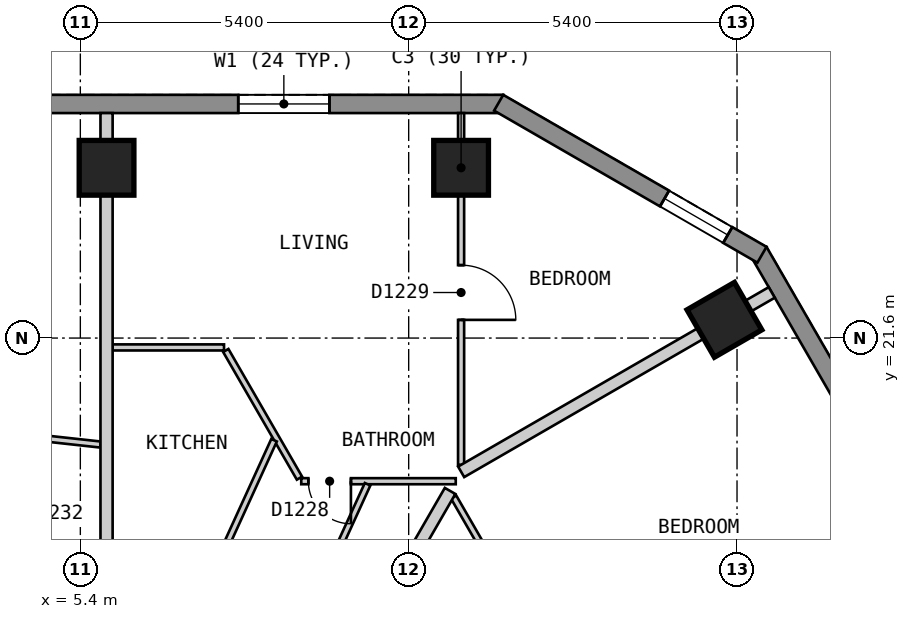
"""IFC4 building model, lengths in metres.
Left out: names, types, materials, properties, quantities, classifications, styles, units other than length and angle.
Written with IfcOpenShell. Run it as: python <this file> out.ifc"""

import sys

from ifc_helpers import new_model, si_unit, direction, frame, frame_2d, origin, origin_2d, place, context, subcontext, project, spatial, polyline, rectangle, outline, extrude, element, fill, save


model = new_model("IFC4")
c1 = context("Model", 3, precision=1e-05, world=origin(), true_north=direction((0.0, 1.0)))
c2 = subcontext(c1, "Body", "Model", "MODEL_VIEW")
j1 = project(units=[si_unit("LENGTHUNIT", "METRE"), si_unit("PLANEANGLEUNIT", "RADIAN")], contexts=[c1])
p1 = place(None, origin())
s1 = spatial("IfcSite", under=j1, at=p1, CompositionType="ELEMENT")
p2 = place(p1, origin())
s2 = spatial("IfcBuilding", under=s1, at=p2, CompositionType="ELEMENT")
p3 = place(p2, frame((0.0, 0.0, 129.6)))
s3 = spatial("IfcBuildingStorey", under=s2, at=p3, CompositionType="ELEMENT", Elevation=129.6)
for number, where, z_axis, x_axis in (
    (1, (11.662, 24.4, 0.0), (0.0, 0.0, 1.0), (-1.0, 0.0, 0.0)),
    (2, (5.831, 24.4, 0.0), (0.0, 0.0, 1.0), (-1.0, 0.0, 0.0)),
    (3, (15.993, 21.9, 0.0), (0.0, 0.0, 1.0), (-0.5, 0.866, 0.0)),
):
    element("IfcColumn", number, at=place(p3, frame(where, z_axis=z_axis, x_axis=x_axis)), inside=s3, PredefinedType="COLUMN", context=c2, shape_type="SweptSolid", body=[
        extrude(rectangle(XDim=0.9, YDim=0.9, at=origin_2d()), origin(), (0.0, 0.0, 1.0), 3.0),
    ])
p4 = place(p3, frame((12.355, 25.45, 0.0), z_axis=(0.0, 0.0, 1.0), x_axis=(-1.0, 0.0, 0.0)))
e4 = element("IfcWall", 4, at=p4, inside=s3, PredefinedType="SOLIDWALL", context=c2, shape_type="SweptSolid", body=[
    extrude(outline(polyline([(0.0, -0.15), (24.71, -0.15), (24.63, 0.15), (0.08, 0.15), (0.0, -0.15)])), origin(), (0.0, 0.0, 1.0), 2.7),
])
p5 = place(p4, frame((2.858, 0.0, 0.15)))
e5 = element("IfcOpeningElement", 5, at=p5, cuts=e4, PredefinedType="OPENING", context=c2, shape_type="SweptSolid", body=[
    extrude(rectangle(XDim=1.5, YDim=2.1, at=frame_2d((0.75, 1.05))), frame((0.0, 0.16, 0.0), z_axis=(0.0, -1.0, 0.0), x_axis=(1.0, 0.0, 0.0)), (0.0, 0.0, 1.0), 0.32),
])
p6 = place(p4, frame((8.689, 0.0, 0.15)))
e6 = element("IfcOpeningElement", 6, at=p6, cuts=e4, PredefinedType="OPENING", context=c2, shape_type="SweptSolid", body=[
    extrude(rectangle(XDim=1.5, YDim=2.1, at=frame_2d((0.75, 1.05))), frame((0.0, 0.16, 0.0), z_axis=(0.0, -1.0, 0.0), x_axis=(1.0, 0.0, 0.0)), (0.0, 0.0, 1.0), 0.32),
])
p7 = place(p4, frame((14.521, 0.0, 0.15)))
e7 = element("IfcOpeningElement", 7, at=p7, cuts=e4, PredefinedType="OPENING", context=c2, shape_type="SweptSolid", body=[
    extrude(rectangle(XDim=1.5, YDim=2.1, at=frame_2d((0.75, 1.05))), frame((0.0, 0.16, 0.0), z_axis=(0.0, -1.0, 0.0), x_axis=(1.0, 0.0, 0.0)), (0.0, 0.0, 1.0), 0.32),
])
p8 = place(p4, frame((20.352, 0.0, 0.15)))
e8 = element("IfcOpeningElement", 8, at=p8, cuts=e4, PredefinedType="OPENING", context=c2, shape_type="SweptSolid", body=[
    extrude(rectangle(XDim=1.5, YDim=2.1, at=frame_2d((0.75, 1.05))), frame((0.0, 0.16, 0.0), z_axis=(0.0, -1.0, 0.0), x_axis=(1.0, 0.0, 0.0)), (0.0, 0.0, 1.0), 0.32),
])
p9 = place(p3, frame((28.218, 2.825, 0.0), z_axis=(0.0, 0.0, 1.0), x_axis=(-0.500020536353, 0.866013546791, 0.0)))
e9 = element("IfcWall", 9, at=p9, inside=s3, PredefinedType="SOLIDWALL", context=c2, shape_type="SweptSolid", body=[
    extrude(outline(polyline([(0.0, -0.15), (23.325, -0.15), (23.245, 0.15), (0.08, 0.15), (0.0, -0.15)])), origin(), (0.0, 0.0, 1.0), 2.7),
])
p10 = place(p9, frame((2.685, 0.0, 0.15)))
e10 = element("IfcOpeningElement", 10, at=p10, cuts=e9, PredefinedType="OPENING", context=c2, shape_type="SweptSolid", body=[
    extrude(rectangle(XDim=1.5, YDim=2.1, at=frame_2d((0.75, 1.05))), frame((0.0, 0.16, 0.0), z_axis=(0.0, -1.0, 0.0), x_axis=(1.0, 0.0, 0.0)), (0.0, 0.0, 1.0), 0.32),
])
p11 = place(p9, frame((8.17, 0.0, 0.15)))
e11 = element("IfcOpeningElement", 11, at=p11, cuts=e9, PredefinedType="OPENING", context=c2, shape_type="SweptSolid", body=[
    extrude(rectangle(XDim=1.5, YDim=2.1, at=frame_2d((0.75, 1.05))), frame((0.0, 0.16, 0.0), z_axis=(0.0, -1.0, 0.0), x_axis=(1.0, 0.0, 0.0)), (0.0, 0.0, 1.0), 0.32),
])
p12 = place(p9, frame((13.655, 0.0, 0.15)))
e12 = element("IfcOpeningElement", 12, at=p12, cuts=e9, PredefinedType="OPENING", context=c2, shape_type="SweptSolid", body=[
    extrude(rectangle(XDim=1.5, YDim=2.1, at=frame_2d((0.75, 1.05))), frame((0.0, 0.16, 0.0), z_axis=(0.0, -1.0, 0.0), x_axis=(1.0, 0.0, 0.0)), (0.0, 0.0, 1.0), 0.32),
])
p13 = place(p9, frame((19.14, 0.0, 0.15)))
e13 = element("IfcOpeningElement", 13, at=p13, cuts=e9, PredefinedType="OPENING", context=c2, shape_type="SweptSolid", body=[
    extrude(rectangle(XDim=1.5, YDim=2.1, at=frame_2d((0.75, 1.05))), frame((0.0, 0.16, 0.0), z_axis=(0.0, -1.0, 0.0), x_axis=(1.0, 0.0, 0.0)), (0.0, 0.0, 1.0), 0.32),
])
p14 = place(p3, frame((16.61, 22.97, 0.0), z_axis=(0.0, 0.0, 1.0), x_axis=(-0.866022959057, 0.500004234368, 0.0)))
e14 = element("IfcWall", 14, at=p14, inside=s3, PredefinedType="SOLIDWALL", context=c2, shape_type="SweptSolid", body=[
    extrude(outline(polyline([(0.0, -0.15), (5.0, -0.15), (4.92, 0.15), (0.08, 0.15), (0.0, -0.15)])), origin(), (0.0, 0.0, 1.0), 2.7),
])
p15 = place(p14, frame((0.65, 0.0, 0.15)))
e15 = element("IfcOpeningElement", 15, at=p15, cuts=e14, PredefinedType="OPENING", context=c2, shape_type="SweptSolid", body=[
    extrude(rectangle(XDim=1.2, YDim=2.1, at=frame_2d((0.6, 1.05))), frame((0.0, 0.16, 0.0), z_axis=(0.0, -1.0, 0.0), x_axis=(1.0, 0.0, 0.0)), (0.0, 0.0, 1.0), 0.32),
])
p16 = place(p3, frame((7.792, 21.396, 0.0), z_axis=(0.0, 0.0, 1.0), x_axis=(0.499821239653, -0.866128586522, 0.0)))
e16 = element("IfcWall", 16, at=p16, inside=s3, PredefinedType="PARTITIONING", context=c2, shape_type="SweptSolid", body=[
    extrude(rectangle(XDim=2.425, YDim=0.1, at=frame_2d((1.212, 0.0))), origin(), (0.0, 0.0, 1.0), 2.7),
])
p17 = place(p3, frame((11.539, 18.986, 0.0), z_axis=(0.0, 0.0, 1.0), x_axis=(0.500019453803, -0.866014171835, 0.0)))
e17 = element("IfcWall", 17, at=p17, inside=s3, PredefinedType="PARTITIONING", context=c2, shape_type="SweptSolid", body=[
    extrude(rectangle(XDim=16.057, YDim=0.1, at=frame_2d((8.029, 0.0))), origin(), (0.0, 0.0, 1.0), 2.7),
])
p18 = place(p17, frame((7.48, 0.0, 0.0)))
e18 = element("IfcOpeningElement", 18, at=p18, cuts=e17, PredefinedType="OPENING", context=c2, shape_type="SweptSolid", body=[
    extrude(rectangle(XDim=0.9, YDim=2.1, at=frame_2d((0.45, 1.05))), frame((0.0, 0.06, 0.0), z_axis=(0.0, -1.0, 0.0), x_axis=(1.0, 0.0, 0.0)), (0.0, 0.0, 1.0), 0.12),
])
p19 = place(p3, frame((2.419, 20.213, 0.0), z_axis=(0.0, 0.0, 1.0), x_axis=(0.994022340378, -0.109176860325, 0.0)))
e19 = element("IfcWall", 19, at=p19, inside=s3, PredefinedType="PARTITIONING", context=c2, shape_type="SweptSolid", body=[
    extrude(rectangle(XDim=3.332, YDim=0.1, at=frame_2d((1.666, 0.0))), origin(), (0.0, 0.0, 1.0), 2.7),
])
p20 = place(p3, frame((9.033, 19.246, 0.0), z_axis=(0.0, 0.0, 1.0), x_axis=(1.0, 0.0, 0.0)))
e20 = element("IfcWall", 20, at=p20, inside=s3, PredefinedType="PARTITIONING", context=c2, shape_type="SweptSolid", body=[
    extrude(rectangle(XDim=2.541, YDim=0.1, at=frame_2d((1.271, 0.0))), origin(), (0.0, 0.0, 1.0), 2.7),
])
p21 = place(p20, frame((0.117, 0.0, 0.0)))
e21 = element("IfcOpeningElement", 21, at=p21, cuts=e20, PredefinedType="OPENING", context=c2, shape_type="SweptSolid", body=[
    extrude(rectangle(XDim=0.7, YDim=2.1, at=frame_2d((0.35, 1.05))), frame((0.0, 0.06, 0.0), z_axis=(0.0, -1.0, 0.0), x_axis=(1.0, 0.0, 0.0)), (0.0, 0.0, 1.0), 0.12),
])
p22 = place(p3, frame((5.931, 21.446, 0.0), z_axis=(0.0, 0.0, 1.0), x_axis=(1.0, 0.0, 0.0)))
e22 = element("IfcWall", 22, at=p22, inside=s3, PredefinedType="PARTITIONING", context=c2, shape_type="SweptSolid", body=[
    extrude(rectangle(XDim=1.832, YDim=0.1, at=frame_2d((0.916, 0.0))), origin(), (0.0, 0.0, 1.0), 2.7),
])
p23 = place(p3, frame((8.346, 15.3, 0.0), z_axis=(0.0, 0.0, 1.0), x_axis=(0.415189790387, 0.909734817383, 0.0)))
e23 = element("IfcWall", 23, at=p23, inside=s3, PredefinedType="PARTITIONING", context=c2, shape_type="SweptSolid", body=[
    extrude(rectangle(XDim=4.282, YDim=0.1, at=frame_2d((2.141, 0.0))), origin(), (0.0, 0.0, 1.0), 2.7),
])
p24 = place(p23, frame((1.714, 0.0, 0.0)))
e24 = element("IfcOpeningElement", 24, at=p24, cuts=e23, PredefinedType="OPENING", context=c2, shape_type="SweptSolid", body=[
    extrude(rectangle(XDim=0.8, YDim=2.1, at=frame_2d((0.4, 1.05))), frame((0.0, 0.06, 0.0), z_axis=(0.0, -1.0, 0.0), x_axis=(1.0, 0.0, 0.0)), (0.0, 0.0, 1.0), 0.12),
])
p25 = place(p3, frame((6.6, 15.569, 0.0), z_axis=(0.0, 0.0, 1.0), x_axis=(0.415221636251, 0.909720282718, 0.0)))
e25 = element("IfcWall", 25, at=p25, inside=s3, PredefinedType="PARTITIONING", context=c2, shape_type="SweptSolid", body=[
    extrude(rectangle(XDim=4.783, YDim=0.1, at=frame_2d((2.391, 0.0))), origin(), (0.0, 0.0, 1.0), 2.7),
])
p26 = place(p25, frame((1.911, 0.0, 0.0)))
e26 = element("IfcOpeningElement", 26, at=p26, cuts=e25, PredefinedType="OPENING", context=c2, shape_type="SweptSolid", body=[
    extrude(rectangle(XDim=0.9, YDim=2.1, at=frame_2d((0.45, 1.05))), frame((0.0, 0.06, 0.0), z_axis=(0.0, -1.0, 0.0), x_axis=(1.0, 0.0, 0.0)), (0.0, 0.0, 1.0), 0.12),
])
p27 = place(p3, frame((11.662, 19.514, 0.0), z_axis=(0.0, 0.0, 1.0), x_axis=(0.0, 1.0, 0.0)))
e27 = element("IfcWall", 27, at=p27, inside=s3, PredefinedType="PARTITIONING", context=c2, shape_type="SweptSolid", body=[
    extrude(rectangle(XDim=5.786, YDim=0.1, at=frame_2d((2.893, 0.0))), origin(), (0.0, 0.0, 1.0), 2.7),
])
p28 = place(p27, frame((2.385, 0.0, 0.0)))
e28 = element("IfcOpeningElement", 28, at=p28, cuts=e27, PredefinedType="OPENING", context=c2, shape_type="SweptSolid", body=[
    extrude(rectangle(XDim=0.9, YDim=2.1, at=frame_2d((0.45, 1.05))), frame((0.0, 0.06, 0.0), z_axis=(0.0, -1.0, 0.0), x_axis=(1.0, 0.0, 0.0)), (0.0, 0.0, 1.0), 0.12),
])
p29 = place(p3, frame((9.238, 15.2, 0.0), z_axis=(0.0, 0.0, 1.0), x_axis=(0.499890453443, 0.866088641281, 0.0)))
e29 = element("IfcWall", 29, at=p29, inside=s3, PredefinedType="PARTITIONING", context=c2, shape_type="SweptSolid", body=[
    extrude(rectangle(XDim=4.487, YDim=0.2, at=frame_2d((2.243, 0.0))), origin(), (0.0, 0.0, 1.0), 2.7),
])
p30 = place(p3, frame((5.831, 16.903, 0.0), z_axis=(0.0, 0.0, 1.0), x_axis=(0.0, 1.0, 0.0)))
e30 = element("IfcWall", 30, at=p30, inside=s3, PredefinedType="PARTITIONING", context=c2, shape_type="SweptSolid", body=[
    extrude(rectangle(XDim=8.397, YDim=0.2, at=frame_2d((4.198, 0.0))), origin(), (0.0, 0.0, 1.0), 2.7),
])
p31 = place(p3, frame((11.663, 19.4, 0.0), z_axis=(0.0, 0.0, 1.0), x_axis=(0.865941558533, 0.500145196124, 0.0)))
e31 = element("IfcWall", 31, at=p31, inside=s3, PredefinedType="PARTITIONING", context=c2, shape_type="SweptSolid", body=[
    extrude(rectangle(XDim=5.899, YDim=0.2, at=frame_2d((2.949, 0.0))), origin(), (0.0, 0.0, 1.0), 2.7),
])
p32 = place(p5, origin())
e32 = element("IfcWindow", 32, at=p32, inside=s3, PartitioningType="SINGLE_PANEL", PredefinedType="WINDOW", context=c2, shape_type="SweptSolid", body=[
    extrude(rectangle(XDim=1.5, YDim=2.1, at=frame_2d((0.75, 1.05))), frame((0.0, 0.03, 0.0), z_axis=(0.0, -1.0, 0.0), x_axis=(1.0, 0.0, 0.0)), (0.0, 0.0, 1.0), 0.06),
])
fill(e5, e32)
p33 = place(p15, origin())
e33 = element("IfcWindow", 33, at=p33, inside=s3, PartitioningType="SINGLE_PANEL", PredefinedType="WINDOW", context=c2, shape_type="SweptSolid", body=[
    extrude(rectangle(XDim=1.2, YDim=2.1, at=frame_2d((0.6, 1.05))), frame((0.0, 0.03, 0.0), z_axis=(0.0, -1.0, 0.0), x_axis=(1.0, 0.0, 0.0)), (0.0, 0.0, 1.0), 0.06),
])
fill(e15, e33)
p34 = place(p21, origin())
e34 = element("IfcDoor", 34, at=p34, inside=s3, OperationType="SINGLE_SWING_RIGHT", PredefinedType="DOOR", context=c2, shape_type="SweptSolid", body=[
    extrude(rectangle(XDim=0.7, YDim=2.1, at=frame_2d((0.35, 1.05))), frame((0.0, 0.025, 0.0), z_axis=(0.0, -1.0, 0.0), x_axis=(1.0, 0.0, 0.0)), (0.0, 0.0, 1.0), 0.05),
])
fill(e21, e34)
p35 = place(p28, origin())
e35 = element("IfcDoor", 35, at=p35, inside=s3, OperationType="SINGLE_SWING_LEFT", PredefinedType="DOOR", context=c2, shape_type="SweptSolid", body=[
    extrude(rectangle(XDim=0.9, YDim=2.1, at=frame_2d((0.45, 1.05))), frame((0.0, 0.025, 0.0), z_axis=(0.0, -1.0, 0.0), x_axis=(1.0, 0.0, 0.0)), (0.0, 0.0, 1.0), 0.05),
])
fill(e28, e35)
save(model, sys.argv[1])
